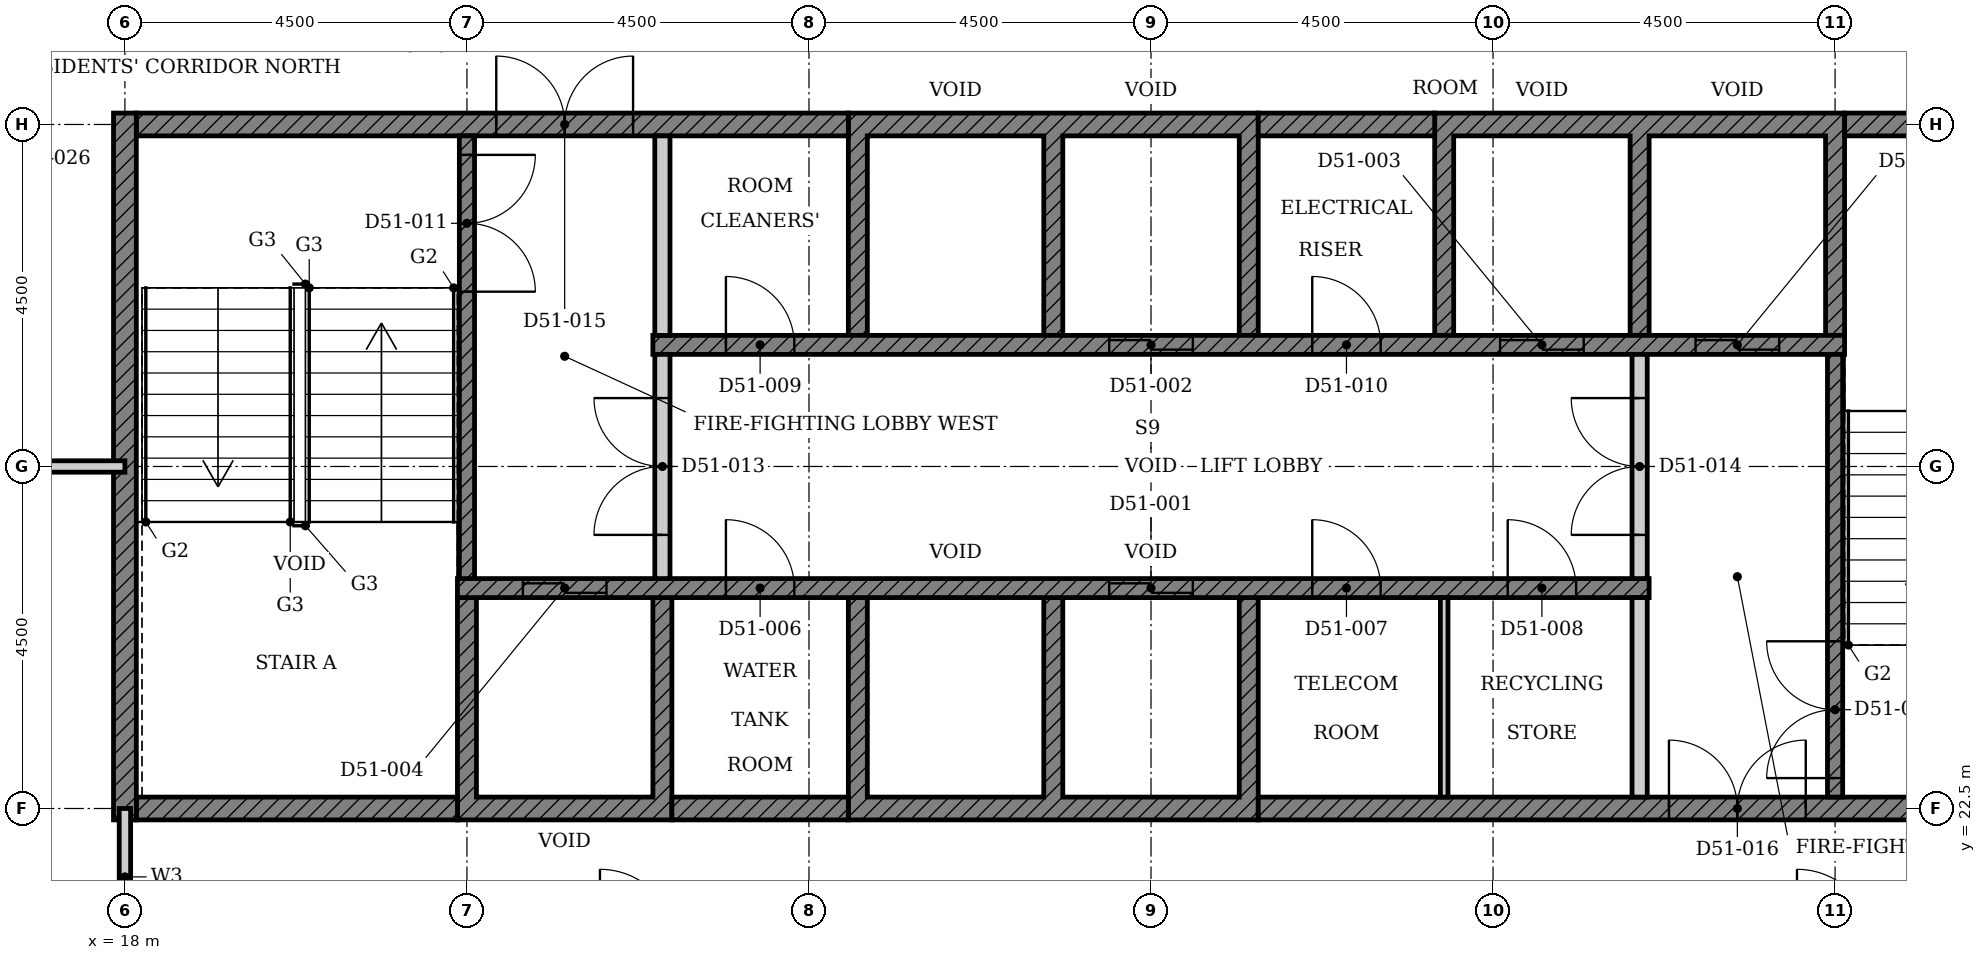
"""IFC4 building model, lengths in metres.
Left out: names, types, materials, properties, quantities, classifications, styles, units other than length and angle.
Written with IfcOpenShell. Run it as: python <this file> out.ifc"""

import sys

from ifc_helpers import new_model, si_unit, direction, frame, frame_2d, origin, place, context, subcontext, project, spatial, polyline, rectangle, outline, extrude, element, fill, save


model = new_model("IFC4")
c1 = context("Model", 3, precision=1e-05, world=origin(), true_north=direction((0.0, 1.0)))
c2 = subcontext(c1, "Body", "Model", "MODEL_VIEW")
j1 = project(units=[si_unit("LENGTHUNIT", "METRE"), si_unit("PLANEANGLEUNIT", "RADIAN")], contexts=[c1])
p1 = place(None, origin())
s1 = spatial("IfcSite", under=j1, at=p1, CompositionType="ELEMENT")
p2 = place(p1, origin())
s2 = spatial("IfcBuilding", under=s1, at=p2, CompositionType="ELEMENT")
p3 = place(p2, frame((0.0, 0.0, 203.5)))
s3 = spatial("IfcBuildingStorey", under=s2, at=p3, CompositionType="ELEMENT", Elevation=203.5)
p4 = place(p3, origin())
e1 = element("IfcWall", 1, at=p4, inside=s3, PredefinedType="SHEAR", context=c2, shape_type="SweptSolid", body=[
    extrude(outline(polyline([(22.375, 22.35), (25.197, 22.35), (25.197, 25.275), (24.947, 25.275), (24.947, 22.65), (22.625, 22.65), (22.625, 25.275), (22.375, 25.275), (22.375, 22.35)])), origin(), (0.0, 0.0, 1.0), 3.4),
])
p5 = place(p3, origin())
e2 = element("IfcWall", 2, at=p5, inside=s3, PredefinedType="SHEAR", context=c2, shape_type="SweptSolid", body=[
    extrude(outline(polyline([(27.518, 22.35), (32.911, 22.35), (32.911, 25.275), (32.661, 25.275), (32.661, 22.65), (30.339, 22.65), (30.339, 25.275), (30.089, 25.275), (30.089, 22.65), (27.768, 22.65), (27.768, 25.275), (27.518, 25.275), (27.518, 22.35)])), origin(), (0.0, 0.0, 1.0), 3.4),
])
p6 = place(p3, origin())
e3 = element("IfcWall", 3, at=p6, inside=s3, PredefinedType="SHEAR", context=c2, shape_type="SweptSolid", body=[
    extrude(outline(polyline([(27.518, 28.725), (27.768, 28.725), (27.768, 31.35), (30.089, 31.35), (30.089, 28.725), (30.339, 28.725), (30.339, 31.35), (32.661, 31.35), (32.661, 28.725), (32.911, 28.725), (32.911, 31.65), (27.518, 31.65), (27.518, 28.725)])), origin(), (0.0, 0.0, 1.0), 3.4),
])
p7 = place(p3, origin())
e4 = element("IfcWall", 4, at=p7, inside=s3, PredefinedType="SHEAR", context=c2, shape_type="SweptSolid", body=[
    extrude(outline(polyline([(35.232, 28.725), (35.482, 28.725), (35.482, 31.35), (37.803, 31.35), (37.803, 28.725), (38.053, 28.725), (38.053, 31.35), (40.375, 31.35), (40.375, 28.725), (40.625, 28.725), (40.625, 31.65), (35.232, 31.65), (35.232, 28.725)])), origin(), (0.0, 0.0, 1.0), 3.4),
])
p8 = place(p3, frame((18.15, 22.5, 0.0), z_axis=(0.0, 0.0, 1.0), x_axis=(1.0, 0.0, 0.0)))
e5 = element("IfcWall", 5, at=p8, inside=s3, PredefinedType="SHEAR", context=c2, shape_type="SweptSolid", body=[
    extrude(rectangle(XDim=4.225, YDim=0.3, at=frame_2d((2.113, 0.0))), origin(), (0.0, 0.0, 1.0), 3.4),
])
p9 = place(p3, frame((25.197, 22.5, 0.0), z_axis=(0.0, 0.0, 1.0), x_axis=(1.0, 0.0, 0.0)))
e6 = element("IfcWall", 6, at=p9, inside=s3, PredefinedType="SHEAR", context=c2, shape_type="SweptSolid", body=[
    extrude(rectangle(XDim=2.321, YDim=0.3, at=frame_2d((1.161, 0.0))), origin(), (0.0, 0.0, 1.0), 3.4),
])
p10 = place(p3, frame((32.911, 22.5, 0.0), z_axis=(0.0, 0.0, 1.0), x_axis=(1.0, 0.0, 0.0)))
e7 = element("IfcWall", 7, at=p10, inside=s3, PredefinedType="SHEAR", context=c2, shape_type="SweptSolid", body=[
    extrude(rectangle(XDim=11.939, YDim=0.3, at=frame_2d((5.97, 0.0))), origin(), (0.0, 0.0, 1.0), 3.4),
])
p11 = place(p10, frame((5.404, 0.0, 0.0)))
e8 = element("IfcOpeningElement", 8, at=p11, cuts=e7, PredefinedType="OPENING", context=c2, shape_type="SweptSolid", body=[
    extrude(rectangle(XDim=1.8, YDim=2.1, at=frame_2d((0.9, 1.05))), frame((0.0, 0.16, 0.0), z_axis=(0.0, -1.0, 0.0), x_axis=(1.0, 0.0, 0.0)), (0.0, 0.0, 1.0), 0.32),
])
p12 = place(p3, frame((18.15, 31.5, 0.0), z_axis=(0.0, 0.0, 1.0), x_axis=(1.0, 0.0, 0.0)))
e9 = element("IfcWall", 9, at=p12, inside=s3, PredefinedType="SHEAR", context=c2, shape_type="SweptSolid", body=[
    extrude(rectangle(XDim=9.368, YDim=0.3, at=frame_2d((4.684, 0.0))), origin(), (0.0, 0.0, 1.0), 3.4),
])
p13 = place(p12, frame((4.736, 0.0, 0.0)))
e10 = element("IfcOpeningElement", 10, at=p13, cuts=e9, PredefinedType="OPENING", context=c2, shape_type="SweptSolid", body=[
    extrude(rectangle(XDim=1.8, YDim=2.1, at=frame_2d((0.9, 1.05))), frame((0.0, 0.16, 0.0), z_axis=(0.0, -1.0, 0.0), x_axis=(1.0, 0.0, 0.0)), (0.0, 0.0, 1.0), 0.32),
])
p14 = place(p3, frame((32.911, 31.5, 0.0), z_axis=(0.0, 0.0, 1.0), x_axis=(1.0, 0.0, 0.0)))
e11 = element("IfcWall", 11, at=p14, inside=s3, PredefinedType="SHEAR", context=c2, shape_type="SweptSolid", body=[
    extrude(rectangle(XDim=2.322, YDim=0.3, at=frame_2d((1.161, 0.0))), origin(), (0.0, 0.0, 1.0), 3.4),
])
p15 = place(p3, frame((40.625, 31.5, 0.0), z_axis=(0.0, 0.0, 1.0), x_axis=(1.0, 0.0, 0.0)))
e12 = element("IfcWall", 12, at=p15, inside=s3, PredefinedType="SHEAR", context=c2, shape_type="SweptSolid", body=[
    extrude(rectangle(XDim=4.225, YDim=0.3, at=frame_2d((2.113, 0.0))), origin(), (0.0, 0.0, 1.0), 3.4),
])
p16 = place(p3, frame((18.0, 22.35, 0.0), z_axis=(0.0, 0.0, 1.0), x_axis=(0.0, 1.0, 0.0)))
e13 = element("IfcWall", 13, at=p16, inside=s3, PredefinedType="SHEAR", context=c2, shape_type="SweptSolid", body=[
    extrude(rectangle(XDim=9.3, YDim=0.3, at=frame_2d((4.65, 0.0))), origin(), (0.0, 0.0, 1.0), 3.4),
])
p17 = place(p3, frame((22.375, 25.4, 0.0), z_axis=(0.0, 0.0, 1.0), x_axis=(1.0, 0.0, 0.0)))
e14 = element("IfcWall", 14, at=p17, inside=s3, PredefinedType="SHEAR", context=c2, shape_type="SweptSolid", body=[
    extrude(rectangle(XDim=15.678, YDim=0.25, at=frame_2d((7.839, 0.0))), origin(), (0.0, 0.0, 1.0), 3.4),
])
p18 = place(p17, frame((8.575, 0.0, 0.0)))
e15 = element("IfcOpeningElement", 15, at=p18, cuts=e14, PredefinedType="OPENING", context=c2, shape_type="SweptSolid", body=[
    extrude(rectangle(XDim=1.1, YDim=2.1, at=frame_2d((0.55, 1.05))), frame((0.0, 0.135, 0.0), z_axis=(0.0, -1.0, 0.0), x_axis=(1.0, 0.0, 0.0)), (0.0, 0.0, 1.0), 0.27),
])
p19 = place(p17, frame((0.861, 0.0, 0.0)))
e16 = element("IfcOpeningElement", 16, at=p19, cuts=e14, PredefinedType="OPENING", context=c2, shape_type="SweptSolid", body=[
    extrude(rectangle(XDim=1.1, YDim=2.1, at=frame_2d((0.55, 1.05))), frame((0.0, 0.135, 0.0), z_axis=(0.0, -1.0, 0.0), x_axis=(1.0, 0.0, 0.0)), (0.0, 0.0, 1.0), 0.27),
])
p20 = place(p17, frame((3.532, 0.0, 0.0)))
e17 = element("IfcOpeningElement", 17, at=p20, cuts=e14, PredefinedType="OPENING", context=c2, shape_type="SweptSolid", body=[
    extrude(rectangle(XDim=0.9, YDim=2.1, at=frame_2d((0.45, 1.05))), frame((0.0, 0.135, 0.0), z_axis=(0.0, -1.0, 0.0), x_axis=(1.0, 0.0, 0.0)), (0.0, 0.0, 1.0), 0.27),
])
p21 = place(p17, frame((11.246, 0.0, 0.0)))
e18 = element("IfcOpeningElement", 18, at=p21, cuts=e14, PredefinedType="OPENING", context=c2, shape_type="SweptSolid", body=[
    extrude(rectangle(XDim=0.9, YDim=2.1, at=frame_2d((0.45, 1.05))), frame((0.0, 0.135, 0.0), z_axis=(0.0, -1.0, 0.0), x_axis=(1.0, 0.0, 0.0)), (0.0, 0.0, 1.0), 0.27),
])
p22 = place(p17, frame((13.818, 0.0, 0.0)))
e19 = element("IfcOpeningElement", 19, at=p22, cuts=e14, PredefinedType="OPENING", context=c2, shape_type="SweptSolid", body=[
    extrude(rectangle(XDim=0.9, YDim=2.1, at=frame_2d((0.45, 1.05))), frame((0.0, 0.135, 0.0), z_axis=(0.0, -1.0, 0.0), x_axis=(1.0, 0.0, 0.0)), (0.0, 0.0, 1.0), 0.27),
])
p23 = place(p3, frame((24.947, 28.6, 0.0), z_axis=(0.0, 0.0, 1.0), x_axis=(1.0, 0.0, 0.0)))
e20 = element("IfcWall", 20, at=p23, inside=s3, PredefinedType="SHEAR", context=c2, shape_type="SweptSolid", body=[
    extrude(rectangle(XDim=15.678, YDim=0.25, at=frame_2d((7.839, 0.0))), origin(), (0.0, 0.0, 1.0), 3.4),
])
p24 = place(p23, frame((6.004, 0.0, 0.0)))
e21 = element("IfcOpeningElement", 21, at=p24, cuts=e20, PredefinedType="OPENING", context=c2, shape_type="SweptSolid", body=[
    extrude(rectangle(XDim=1.1, YDim=2.1, at=frame_2d((0.55, 1.05))), frame((0.0, 0.135, 0.0), z_axis=(0.0, -1.0, 0.0), x_axis=(1.0, 0.0, 0.0)), (0.0, 0.0, 1.0), 0.27),
])
p25 = place(p23, frame((11.146, 0.0, 0.0)))
e22 = element("IfcOpeningElement", 22, at=p25, cuts=e20, PredefinedType="OPENING", context=c2, shape_type="SweptSolid", body=[
    extrude(rectangle(XDim=1.1, YDim=2.1, at=frame_2d((0.55, 1.05))), frame((0.0, 0.135, 0.0), z_axis=(0.0, -1.0, 0.0), x_axis=(1.0, 0.0, 0.0)), (0.0, 0.0, 1.0), 0.27),
])
p26 = place(p23, frame((13.718, 0.0, 0.0)))
e23 = element("IfcOpeningElement", 23, at=p26, cuts=e20, PredefinedType="OPENING", context=c2, shape_type="SweptSolid", body=[
    extrude(rectangle(XDim=1.1, YDim=2.1, at=frame_2d((0.55, 1.05))), frame((0.0, 0.135, 0.0), z_axis=(0.0, -1.0, 0.0), x_axis=(1.0, 0.0, 0.0)), (0.0, 0.0, 1.0), 0.27),
])
p27 = place(p23, frame((0.961, 0.0, 0.0)))
e24 = element("IfcOpeningElement", 24, at=p27, cuts=e20, PredefinedType="OPENING", context=c2, shape_type="SweptSolid", body=[
    extrude(rectangle(XDim=0.9, YDim=2.1, at=frame_2d((0.45, 1.05))), frame((0.0, 0.135, 0.0), z_axis=(0.0, -1.0, 0.0), x_axis=(1.0, 0.0, 0.0)), (0.0, 0.0, 1.0), 0.27),
])
p28 = place(p23, frame((8.675, 0.0, 0.0)))
e25 = element("IfcOpeningElement", 25, at=p28, cuts=e20, PredefinedType="OPENING", context=c2, shape_type="SweptSolid", body=[
    extrude(rectangle(XDim=0.9, YDim=2.1, at=frame_2d((0.45, 1.05))), frame((0.0, 0.135, 0.0), z_axis=(0.0, -1.0, 0.0), x_axis=(1.0, 0.0, 0.0)), (0.0, 0.0, 1.0), 0.27),
])
p29 = place(p3, frame((37.928, 22.65, 0.0), z_axis=(0.0, 0.0, 1.0), x_axis=(0.0, 1.0, 0.0)))
e26 = element("IfcWall", 26, at=p29, inside=s3, PredefinedType="PARTITIONING", context=c2, shape_type="SweptSolid", body=[
    extrude(rectangle(XDim=2.625, YDim=0.2, at=frame_2d((1.312, 0.0))), origin(), (0.0, 0.0, 1.0), 3.4),
])
p30 = place(p3, frame((35.357, 22.65, 0.0), z_axis=(0.0, 0.0, 1.0), x_axis=(0.0, 1.0, 0.0)))
e27 = element("IfcWall", 27, at=p30, inside=s3, PredefinedType="PARTITIONING", context=c2, shape_type="SweptSolid", body=[
    extrude(rectangle(XDim=2.625, YDim=0.1, at=frame_2d((1.312, 0.0))), origin(), (0.0, 0.0, 1.0), 3.4),
])
p31 = place(p3, frame((25.072, 28.725, 0.0), z_axis=(0.0, 0.0, 1.0), x_axis=(0.0, 1.0, 0.0)))
e28 = element("IfcWall", 28, at=p31, inside=s3, PredefinedType="PARTITIONING", context=c2, shape_type="SweptSolid", body=[
    extrude(rectangle(XDim=2.625, YDim=0.2, at=frame_2d((1.312, 0.0))), origin(), (0.0, 0.0, 1.0), 3.4),
])
p32 = place(p3, frame((22.5, 31.35, 0.0), z_axis=(0.0, 0.0, 1.0), x_axis=(0.0, -1.0, 0.0)))
e29 = element("IfcWall", 29, at=p32, inside=s3, PredefinedType="SHEAR", context=c2, shape_type="SweptSolid", body=[
    extrude(rectangle(XDim=5.825, YDim=0.2, at=frame_2d((2.913, 0.0))), origin(), (0.0, 0.0, 1.0), 3.4),
])
p33 = place(p32, frame((0.25, 0.0, 0.0)))
e30 = element("IfcOpeningElement", 30, at=p33, cuts=e29, PredefinedType="OPENING", context=c2, shape_type="SweptSolid", body=[
    extrude(rectangle(XDim=1.8, YDim=2.1, at=frame_2d((0.9, 1.05))), frame((0.0, 0.11, 0.0), z_axis=(0.0, -1.0, 0.0), x_axis=(1.0, 0.0, 0.0)), (0.0, 0.0, 1.0), 0.22),
])
p34 = place(p3, frame((40.5, 22.65, 0.0), z_axis=(0.0, 0.0, 1.0), x_axis=(0.0, 1.0, 0.0)))
e31 = element("IfcWall", 31, at=p34, inside=s3, PredefinedType="SHEAR", context=c2, shape_type="SweptSolid", body=[
    extrude(rectangle(XDim=5.825, YDim=0.2, at=frame_2d((2.913, 0.0))), origin(), (0.0, 0.0, 1.0), 3.4),
])
p35 = place(p34, frame((0.25, 0.0, 0.0)))
e32 = element("IfcOpeningElement", 32, at=p35, cuts=e31, PredefinedType="OPENING", context=c2, shape_type="SweptSolid", body=[
    extrude(rectangle(XDim=1.8, YDim=2.1, at=frame_2d((0.9, 1.05))), frame((0.0, 0.11, 0.0), z_axis=(0.0, -1.0, 0.0), x_axis=(1.0, 0.0, 0.0)), (0.0, 0.0, 1.0), 0.22),
])
p36 = place(p3, frame((25.072, 25.525, 0.0), z_axis=(0.0, 0.0, 1.0), x_axis=(0.0, 1.0, 0.0)))
e33 = element("IfcWall", 33, at=p36, inside=s3, PredefinedType="PARTITIONING", context=c2, shape_type="SweptSolid", body=[
    extrude(rectangle(XDim=2.95, YDim=0.2, at=frame_2d((1.475, 0.0))), origin(), (0.0, 0.0, 1.0), 3.4),
])
p37 = place(p36, frame((0.575, 0.0, 0.0)))
e34 = element("IfcOpeningElement", 34, at=p37, cuts=e33, PredefinedType="OPENING", context=c2, shape_type="SweptSolid", body=[
    extrude(rectangle(XDim=1.8, YDim=2.1, at=frame_2d((0.9, 1.05))), frame((0.0, 0.11, 0.0), z_axis=(0.0, -1.0, 0.0), x_axis=(1.0, 0.0, 0.0)), (0.0, 0.0, 1.0), 0.22),
])
p38 = place(p3, frame((37.928, 25.525, 0.0), z_axis=(0.0, 0.0, 1.0), x_axis=(0.0, 1.0, 0.0)))
e35 = element("IfcWall", 35, at=p38, inside=s3, PredefinedType="PARTITIONING", context=c2, shape_type="SweptSolid", body=[
    extrude(rectangle(XDim=2.95, YDim=0.2, at=frame_2d((1.475, 0.0))), origin(), (0.0, 0.0, 1.0), 3.4),
])
p39 = place(p38, frame((0.575, 0.0, 0.0)))
e36 = element("IfcOpeningElement", 36, at=p39, cuts=e35, PredefinedType="OPENING", context=c2, shape_type="SweptSolid", body=[
    extrude(rectangle(XDim=1.8, YDim=2.1, at=frame_2d((0.9, 1.05))), frame((0.0, 0.11, 0.0), z_axis=(0.0, -1.0, 0.0), x_axis=(1.0, 0.0, 0.0)), (0.0, 0.0, 1.0), 0.22),
])
p40 = place(p3, frame((4.5, 27.0, 0.0), z_axis=(0.0, 0.0, 1.0), x_axis=(1.0, 0.0, 0.0)))
e37 = element("IfcWall", 37, at=p40, inside=s3, PredefinedType="PARTITIONING", context=c2, shape_type="SweptSolid", body=[
    extrude(rectangle(XDim=13.5, YDim=0.15, at=frame_2d((6.75, 0.0))), origin(), (0.0, 0.0, 1.0), 2.68),
])
p41 = place(p40, frame((5.35, 0.0, 0.0)))
e38 = element("IfcOpeningElement", 38, at=p41, cuts=e37, PredefinedType="OPENING", context=c2, shape_type="SweptSolid", body=[
    extrude(rectangle(XDim=1.0, YDim=2.1, at=frame_2d((0.5, 1.05))), frame((0.0, 0.085, 0.0), z_axis=(0.0, -1.0, 0.0), x_axis=(1.0, 0.0, 0.0)), (0.0, 0.0, 1.0), 0.17),
])
p42 = place(p3, frame((18.0, 20.7, 0.0), z_axis=(0.0, 0.0, 1.0), x_axis=(0.0, 1.0, 0.0)))
e39 = element("IfcWall", 39, at=p42, inside=s3, PredefinedType="PARTITIONING", context=c2, shape_type="SweptSolid", body=[
    extrude(rectangle(XDim=1.8, YDim=0.15, at=frame_2d((0.9, 0.0))), origin(), (0.0, 0.0, 1.0), 3.4),
])
p43 = place(p18, origin())
e40 = element("IfcDoor", 40, at=p43, inside=s3, OperationType="DOUBLE_DOOR_SLIDING", PredefinedType="DOOR", context=c2, shape_type="SweptSolid", body=[
    extrude(rectangle(XDim=1.1, YDim=2.1, at=frame_2d((0.55, 1.05))), frame((0.0, 0.025, 0.0), z_axis=(0.0, -1.0, 0.0), x_axis=(1.0, 0.0, 0.0)), (0.0, 0.0, 1.0), 0.05),
])
fill(e15, e40)
p44 = place(p24, origin())
e41 = element("IfcDoor", 41, at=p44, inside=s3, OperationType="DOUBLE_DOOR_SLIDING", PredefinedType="DOOR", context=c2, shape_type="SweptSolid", body=[
    extrude(rectangle(XDim=1.1, YDim=2.1, at=frame_2d((0.55, 1.05))), frame((0.0, 0.025, 0.0), z_axis=(0.0, -1.0, 0.0), x_axis=(1.0, 0.0, 0.0)), (0.0, 0.0, 1.0), 0.05),
])
fill(e21, e41)
p45 = place(p25, origin())
e42 = element("IfcDoor", 42, at=p45, inside=s3, OperationType="DOUBLE_DOOR_SLIDING", PredefinedType="DOOR", context=c2, shape_type="SweptSolid", body=[
    extrude(rectangle(XDim=1.1, YDim=2.1, at=frame_2d((0.55, 1.05))), frame((0.0, 0.025, 0.0), z_axis=(0.0, -1.0, 0.0), x_axis=(1.0, 0.0, 0.0)), (0.0, 0.0, 1.0), 0.05),
])
fill(e22, e42)
p46 = place(p19, origin())
e43 = element("IfcDoor", 43, at=p46, inside=s3, OperationType="DOUBLE_DOOR_SLIDING", PredefinedType="DOOR", context=c2, shape_type="SweptSolid", body=[
    extrude(rectangle(XDim=1.1, YDim=2.1, at=frame_2d((0.55, 1.05))), frame((0.0, 0.025, 0.0), z_axis=(0.0, -1.0, 0.0), x_axis=(1.0, 0.0, 0.0)), (0.0, 0.0, 1.0), 0.05),
])
fill(e16, e43)
p47 = place(p26, origin())
e44 = element("IfcDoor", 44, at=p47, inside=s3, OperationType="DOUBLE_DOOR_SLIDING", PredefinedType="DOOR", context=c2, shape_type="SweptSolid", body=[
    extrude(rectangle(XDim=1.1, YDim=2.1, at=frame_2d((0.55, 1.05))), frame((0.0, 0.025, 0.0), z_axis=(0.0, -1.0, 0.0), x_axis=(1.0, 0.0, 0.0)), (0.0, 0.0, 1.0), 0.05),
])
fill(e23, e44)
p48 = place(p20, origin())
e45 = element("IfcDoor", 45, at=p48, inside=s3, OperationType="SINGLE_SWING_LEFT", PredefinedType="DOOR", context=c2, shape_type="SweptSolid", body=[
    extrude(rectangle(XDim=0.9, YDim=2.1, at=frame_2d((0.45, 1.05))), frame((0.0, 0.025, 0.0), z_axis=(0.0, -1.0, 0.0), x_axis=(1.0, 0.0, 0.0)), (0.0, 0.0, 1.0), 0.05),
])
fill(e17, e45)
p49 = place(p21, origin())
e46 = element("IfcDoor", 46, at=p49, inside=s3, OperationType="SINGLE_SWING_LEFT", PredefinedType="DOOR", context=c2, shape_type="SweptSolid", body=[
    extrude(rectangle(XDim=0.9, YDim=2.1, at=frame_2d((0.45, 1.05))), frame((0.0, 0.025, 0.0), z_axis=(0.0, -1.0, 0.0), x_axis=(1.0, 0.0, 0.0)), (0.0, 0.0, 1.0), 0.05),
])
fill(e18, e46)
p50 = place(p22, origin())
e47 = element("IfcDoor", 47, at=p50, inside=s3, OperationType="SINGLE_SWING_LEFT", PredefinedType="DOOR", context=c2, shape_type="SweptSolid", body=[
    extrude(rectangle(XDim=0.9, YDim=2.1, at=frame_2d((0.45, 1.05))), frame((0.0, 0.025, 0.0), z_axis=(0.0, -1.0, 0.0), x_axis=(1.0, 0.0, 0.0)), (0.0, 0.0, 1.0), 0.05),
])
fill(e19, e47)
p51 = place(p27, origin())
e48 = element("IfcDoor", 48, at=p51, inside=s3, OperationType="SINGLE_SWING_LEFT", PredefinedType="DOOR", context=c2, shape_type="SweptSolid", body=[
    extrude(rectangle(XDim=0.9, YDim=2.1, at=frame_2d((0.45, 1.05))), frame((0.0, 0.025, 0.0), z_axis=(0.0, -1.0, 0.0), x_axis=(1.0, 0.0, 0.0)), (0.0, 0.0, 1.0), 0.05),
])
fill(e24, e48)
p52 = place(p28, origin())
e49 = element("IfcDoor", 49, at=p52, inside=s3, OperationType="SINGLE_SWING_LEFT", PredefinedType="DOOR", context=c2, shape_type="SweptSolid", body=[
    extrude(rectangle(XDim=0.9, YDim=2.1, at=frame_2d((0.45, 1.05))), frame((0.0, 0.025, 0.0), z_axis=(0.0, -1.0, 0.0), x_axis=(1.0, 0.0, 0.0)), (0.0, 0.0, 1.0), 0.05),
])
fill(e25, e49)
p53 = place(p33, origin())
e50 = element("IfcDoor", 50, at=p53, inside=s3, OperationType="DOUBLE_DOOR_SINGLE_SWING", PredefinedType="DOOR", context=c2, shape_type="SweptSolid", body=[
    extrude(rectangle(XDim=1.8, YDim=2.1, at=frame_2d((0.9, 1.05))), frame((0.0, 0.025, 0.0), z_axis=(0.0, -1.0, 0.0), x_axis=(1.0, 0.0, 0.0)), (0.0, 0.0, 1.0), 0.05),
])
fill(e30, e50)
p54 = place(p35, origin())
e51 = element("IfcDoor", 51, at=p54, inside=s3, OperationType="DOUBLE_DOOR_SINGLE_SWING", PredefinedType="DOOR", context=c2, shape_type="SweptSolid", body=[
    extrude(rectangle(XDim=1.8, YDim=2.1, at=frame_2d((0.9, 1.05))), frame((0.0, 0.025, 0.0), z_axis=(0.0, -1.0, 0.0), x_axis=(1.0, 0.0, 0.0)), (0.0, 0.0, 1.0), 0.05),
])
fill(e32, e51)
p55 = place(p37, origin())
e52 = element("IfcDoor", 52, at=p55, inside=s3, OperationType="DOUBLE_DOOR_SINGLE_SWING", PredefinedType="DOOR", context=c2, shape_type="SweptSolid", body=[
    extrude(rectangle(XDim=1.8, YDim=2.1, at=frame_2d((0.9, 1.05))), frame((0.0, 0.025, 0.0), z_axis=(0.0, -1.0, 0.0), x_axis=(1.0, 0.0, 0.0)), (0.0, 0.0, 1.0), 0.05),
])
fill(e34, e52)
p56 = place(p39, origin())
e53 = element("IfcDoor", 53, at=p56, inside=s3, OperationType="DOUBLE_DOOR_SINGLE_SWING", PredefinedType="DOOR", context=c2, shape_type="SweptSolid", body=[
    extrude(rectangle(XDim=1.8, YDim=2.1, at=frame_2d((0.9, 1.05))), frame((0.0, 0.025, 0.0), z_axis=(0.0, -1.0, 0.0), x_axis=(1.0, 0.0, 0.0)), (0.0, 0.0, 1.0), 0.05),
])
fill(e36, e53)
p57 = place(p13, origin())
e54 = element("IfcDoor", 54, at=p57, inside=s3, OperationType="DOUBLE_DOOR_SINGLE_SWING", PredefinedType="DOOR", context=c2, shape_type="SweptSolid", body=[
    extrude(rectangle(XDim=1.8, YDim=2.1, at=frame_2d((0.9, 1.05))), frame((0.0, 0.025, 0.0), z_axis=(0.0, -1.0, 0.0), x_axis=(1.0, 0.0, 0.0)), (0.0, 0.0, 1.0), 0.05),
])
fill(e10, e54)
p58 = place(p11, origin())
e55 = element("IfcDoor", 55, at=p58, inside=s3, OperationType="DOUBLE_DOOR_SINGLE_SWING", PredefinedType="DOOR", context=c2, shape_type="SweptSolid", body=[
    extrude(rectangle(XDim=1.8, YDim=2.1, at=frame_2d((0.9, 1.05))), frame((0.0, 0.025, 0.0), z_axis=(0.0, -1.0, 0.0), x_axis=(1.0, 0.0, 0.0)), (0.0, 0.0, 1.0), 0.05),
])
fill(e8, e55)
save(model, sys.argv[1])
